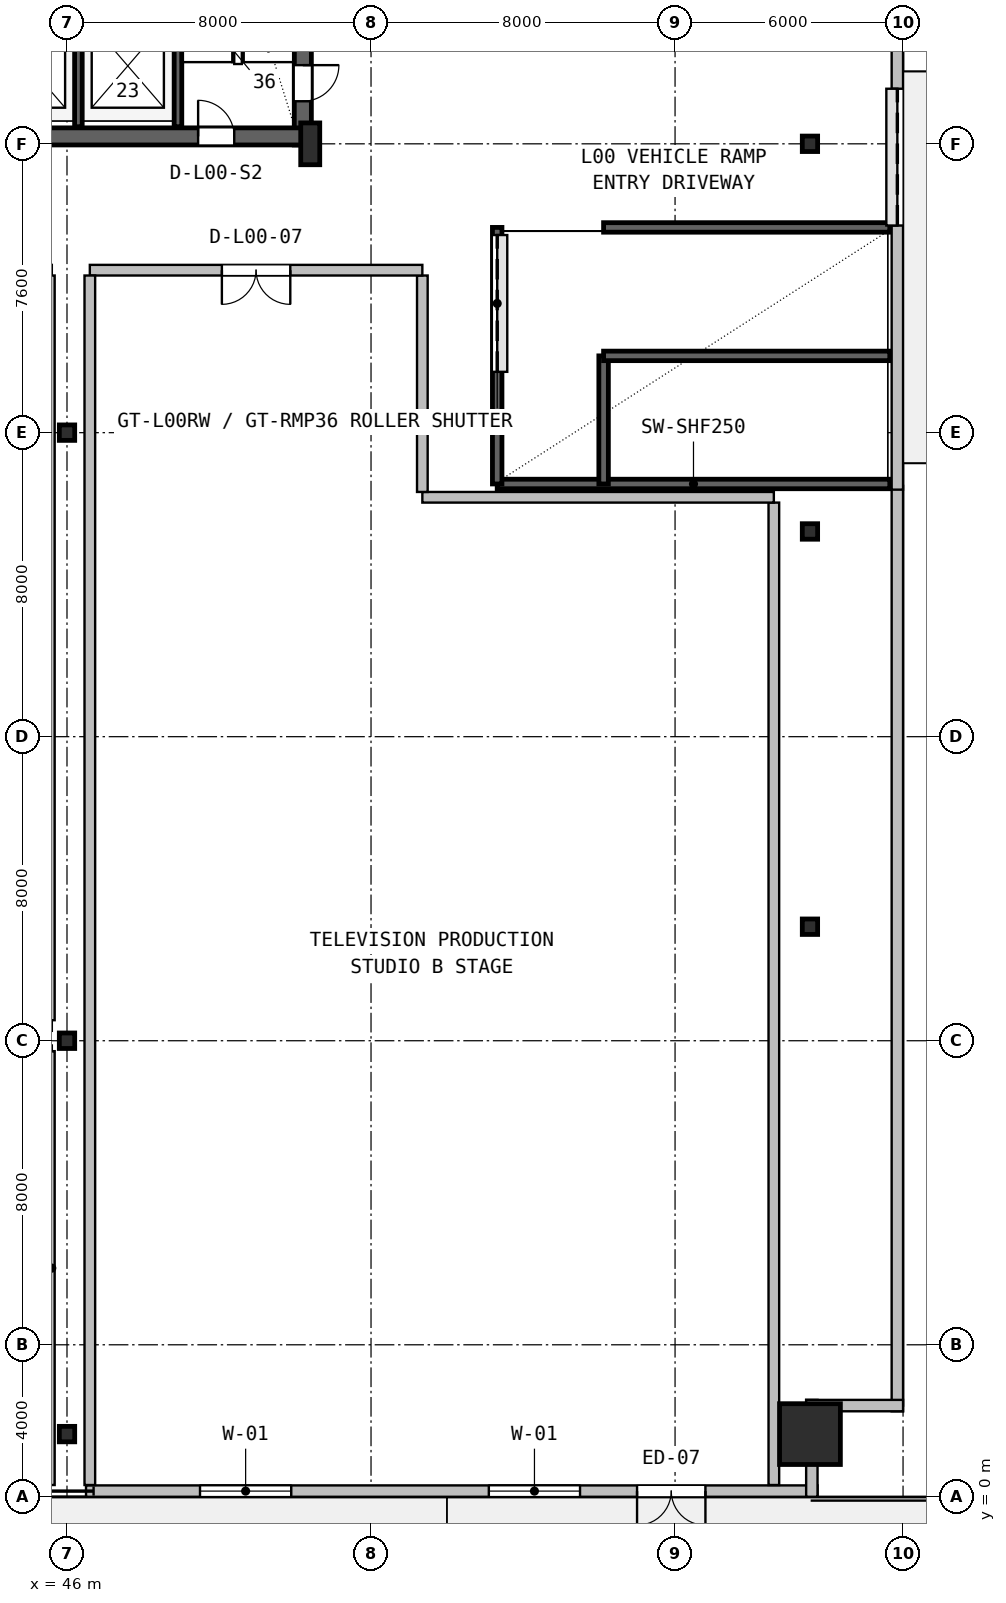
"""IFC4 building model, lengths in metres.
Left out: names, types, materials, properties, quantities, classifications, styles, units other than length and angle.
Written with IfcOpenShell. Run it as: python <this file> out.ifc"""

import sys

from ifc_helpers import new_model, si_unit, direction, frame, frame_2d, origin, origin_2d, place, context, subcontext, project, spatial, rectangle, hollow_rectangle, i_section, extrude, source, transform, mapped, element, fill, save


model = new_model("IFC4")
c1 = context("Model", 3, precision=1e-05, world=origin(), true_north=direction((0.0, 1.0)))
c2 = subcontext(c1, "Body", "Model", "MODEL_VIEW")
j1 = project(units=[si_unit("LENGTHUNIT", "METRE"), si_unit("PLANEANGLEUNIT", "RADIAN")], contexts=[c1])
p1 = place(None, origin())
s1 = spatial("IfcSite", under=j1, at=p1, CompositionType="ELEMENT")
p2 = place(p1, origin())
s2 = spatial("IfcBuilding", under=s1, at=p2, CompositionType="ELEMENT")
p3 = place(p2, origin())
s3 = spatial("IfcBuildingStorey", under=s2, at=p3, CompositionType="ELEMENT", Elevation=0.0)
p4 = place(p3, frame((52.205, 35.57, 0.0), z_axis=(0.0, 0.0, 1.0), x_axis=(0.0, 1.0, 0.0)))
e1 = element("IfcWall", 1, at=p4, inside=s3, PredefinedType="SHEAR", context=c2, shape_type="SweptSolid", body=[
    extrude(rectangle(XDim=11.23, YDim=0.45, at=frame_2d((5.615, 0.0))), origin(), (0.0, 0.0, 1.0), 5.72),
])
p5 = place(p4, frame((1.15, 0.0, 0.0)))
e2 = element("IfcOpeningElement", 2, at=p5, cuts=e1, PredefinedType="OPENING", context=c2, shape_type="SweptSolid", body=[
    extrude(rectangle(XDim=0.95, YDim=2.1, at=frame_2d((0.475, 1.05))), frame((0.0, 0.235, 0.0), z_axis=(0.0, -1.0, 0.0), x_axis=(1.0, 0.0, 0.0)), (0.0, 0.0, 1.0), 0.47),
])
p6 = place(p3, frame((43.2, 35.795, 0.0), z_axis=(0.0, 0.0, 1.0), x_axis=(1.0, 0.0, 0.0)))
e3 = element("IfcWall", 3, at=p6, inside=s3, PredefinedType="SHEAR", context=c2, shape_type="SweptSolid", body=[
    extrude(rectangle(XDim=9.23, YDim=0.45, at=frame_2d((4.615, 0.0))), origin(), (0.0, 0.0, 1.0), 5.72),
])
p7 = place(p6, frame((6.25, 0.0, 0.0)))
e4 = element("IfcOpeningElement", 4, at=p7, cuts=e3, PredefinedType="OPENING", context=c2, shape_type="SweptSolid", body=[
    extrude(rectangle(XDim=0.95, YDim=2.1, at=frame_2d((0.475, 1.05))), frame((0.0, 0.235, 0.0), z_axis=(0.0, -1.0, 0.0), x_axis=(1.0, 0.0, 0.0)), (0.0, 0.0, 1.0), 0.47),
])
m1 = source(origin(), c2, "Body", "SweptSolid", [
    extrude(i_section(OverallWidth=0.5, OverallDepth=1.1, WebThickness=0.018, FlangeThickness=0.032, FilletRadius=0.018, at=origin_2d()), origin(), (0.0, 0.0, 1.0), 6.0),
])
p8 = place(p3, frame((52.4, 35.6, 0.0), z_axis=(0.0, 0.0, 1.0), x_axis=(1.0, 0.0, 0.0)))
e5 = element("IfcColumn", 5, at=p8, inside=s3, PredefinedType="COLUMN", context=c2, shape_type="MappedRepresentation", body=[
    mapped(m1, transform((0.0, 0.0, 0.0), x_axis=(1.0, 0.0, 0.0), y_axis=(0.0, 1.0, 0.0), z_axis=(0.0, 0.0, 1.0), scale=1.0)),
])
m2 = source(origin(), c2, "Body", "SweptSolid", [
    extrude(hollow_rectangle(XDim=1.6, YDim=1.6, WallThickness=0.06, at=origin_2d()), origin(), (0.0, 0.0, 1.0), 6.0),
])
p9 = place(p3, frame((65.55, 1.65, 0.0), z_axis=(0.0, 0.0, 1.0), x_axis=(1.0, 0.0, 0.0)))
e6 = element("IfcColumn", 6, at=p9, inside=s3, PredefinedType="COLUMN", context=c2, shape_type="MappedRepresentation", body=[
    mapped(m2, transform((0.0, 0.0, 0.0), x_axis=(1.0, 0.0, 0.0), y_axis=(0.0, 1.0, 0.0), z_axis=(0.0, 0.0, 1.0), scale=1.0)),
])
m3 = source(origin(), c2, "Body", "SweptSolid", [
    extrude(i_section(OverallWidth=0.404, OverallDepth=0.407, WebThickness=0.027, FlangeThickness=0.044, FilletRadius=0.018, at=origin_2d()), origin(), (0.0, 0.0, 1.0), 6.0),
])
for number, where, z_axis, x_axis in (
    (7, (46.0, 1.65, 0.0), (0.0, 0.0, 1.0), (1.0, 0.0, 0.0)),
    (8, (46.0, 12.0, 0.0), (0.0, 0.0, 1.0), (1.0, 0.0, 0.0)),
    (9, (46.0, 28.0, 0.0), (0.0, 0.0, 1.0), (1.0, 0.0, 0.0)),
    (10, (65.55, 15.0, 0.0), (0.0, 0.0, 1.0), (1.0, 0.0, 0.0)),
    (11, (65.55, 25.4, 0.0), (0.0, 0.0, 1.0), (1.0, 0.0, 0.0)),
    (12, (65.55, 35.6, 0.0), (0.0, 0.0, 1.0), (1.0, 0.0, 0.0)),
):
    element("IfcColumn", number, at=place(p3, frame(where, z_axis=z_axis, x_axis=x_axis)), inside=s3, PredefinedType="COLUMN", context=c2, shape_type="MappedRepresentation", body=[
        mapped(m3, transform((0.0, 0.0, 0.0), x_axis=(1.0, 0.0, 0.0), y_axis=(0.0, 1.0, 0.0), z_axis=(0.0, 0.0, 1.0), scale=1.0)),
    ])
p10 = place(p3, frame((57.32, 26.65, 0.0), z_axis=(0.0, 0.0, 1.0), x_axis=(1.0, 0.0, 0.0)))
e13 = element("IfcWall", 13, at=p10, inside=s3, PredefinedType="SHEAR", context=c2, shape_type="SweptSolid", body=[
    extrude(rectangle(XDim=10.33, YDim=0.25, at=frame_2d((5.165, 0.0))), origin(), (0.0, 0.0, 1.0), 5.72),
])
p11 = place(p3, frame((57.32, 26.65, 0.0), z_axis=(0.0, 0.0, 1.0), x_axis=(0.0, 1.0, 0.0)))
e14 = element("IfcWall", 14, at=p11, inside=s3, PredefinedType="SHEAR", context=c2, shape_type="SweptSolid", body=[
    extrude(rectangle(XDim=6.75, YDim=0.25, at=frame_2d((3.375, 0.0))), origin(), (0.0, 0.0, 1.0), 5.72),
])
p12 = place(p11, frame((2.95, 0.0, 0.0)))
e15 = element("IfcOpeningElement", 15, at=p12, cuts=e14, PredefinedType="OPENING", context=c2, shape_type="SweptSolid", body=[
    extrude(rectangle(XDim=3.6, YDim=2.35, at=frame_2d((1.8, 1.175))), frame((0.0, 0.135, 0.0), z_axis=(0.0, -1.0, 0.0), x_axis=(1.0, 0.0, 0.0)), (0.0, 0.0, 1.0), 0.27),
])
p13 = place(p3, frame((60.12, 33.4, 0.0), z_axis=(0.0, 0.0, 1.0), x_axis=(1.0, 0.0, 0.0)))
e16 = element("IfcWall", 16, at=p13, inside=s3, PredefinedType="SHEAR", context=c2, shape_type="SweptSolid", body=[
    extrude(rectangle(XDim=7.53, YDim=0.25, at=frame_2d((3.765, 0.0))), origin(), (0.0, 0.0, 1.0), 5.72),
])
p14 = place(p3, frame((60.12, 26.65, 0.0), z_axis=(0.0, 0.0, 1.0), x_axis=(0.0, 1.0, 0.0)))
e17 = element("IfcWall", 17, at=p14, inside=s3, PredefinedType="SHEAR", context=c2, shape_type="SweptSolid", body=[
    extrude(rectangle(XDim=3.37, YDim=0.25, at=frame_2d((1.685, 0.0))), origin(), (0.0, 0.0, 1.0), 5.72),
])
p15 = place(p3, frame((60.12, 30.02, 0.0), z_axis=(0.0, 0.0, 1.0), x_axis=(1.0, 0.0, 0.0)))
e18 = element("IfcWall", 18, at=p15, inside=s3, PredefinedType="SHEAR", context=c2, shape_type="SweptSolid", body=[
    extrude(rectangle(XDim=7.53, YDim=0.25, at=frame_2d((3.765, 0.0))), origin(), (0.0, 0.0, 1.0), 5.72),
])
p16 = place(p3, frame((46.5, 0.15, 0.0), z_axis=(0.0, 0.0, 1.0), x_axis=(1.0, 0.0, 0.0)))
e19 = element("IfcWall", 19, at=p16, inside=s3, PredefinedType="SOLIDWALL", context=c2, shape_type="SweptSolid", body=[
    extrude(rectangle(XDim=19.25, YDim=0.3, at=frame_2d((9.625, 0.0))), origin(), (0.0, 0.0, 1.0), 5.7),
])
p17 = place(p16, frame((14.5, 0.0, 0.0)))
e20 = element("IfcOpeningElement", 20, at=p17, cuts=e19, PredefinedType="OPENING", context=c2, shape_type="SweptSolid", body=[
    extrude(rectangle(XDim=1.8, YDim=2.15, at=frame_2d((0.9, 1.075))), frame((0.0, 0.16, 0.0), z_axis=(0.0, -1.0, 0.0), x_axis=(1.0, 0.0, 0.0)), (0.0, 0.0, 1.0), 0.32),
])
p18 = place(p16, frame((3.0, 0.0, 0.9)))
e21 = element("IfcOpeningElement", 21, at=p18, cuts=e19, PredefinedType="OPENING", context=c2, shape_type="SweptSolid", body=[
    extrude(rectangle(XDim=2.4, YDim=2.4, at=frame_2d((1.2, 1.2))), frame((0.0, 0.16, 0.0), z_axis=(0.0, -1.0, 0.0), x_axis=(1.0, 0.0, 0.0)), (0.0, 0.0, 1.0), 0.32),
])
p19 = place(p16, frame((10.6, 0.0, 0.9)))
e22 = element("IfcOpeningElement", 22, at=p19, cuts=e19, PredefinedType="OPENING", context=c2, shape_type="SweptSolid", body=[
    extrude(rectangle(XDim=2.4, YDim=2.4, at=frame_2d((1.2, 1.2))), frame((0.0, 0.16, 0.0), z_axis=(0.0, -1.0, 0.0), x_axis=(1.0, 0.0, 0.0)), (0.0, 0.0, 1.0), 0.32),
])
p20 = place(p3, frame((67.85, 2.25, 0.0), z_axis=(0.0, 0.0, 1.0), x_axis=(0.0, 1.0, 0.0)))
e23 = element("IfcWall", 23, at=p20, inside=s3, PredefinedType="SOLIDWALL", context=c2, shape_type="SweptSolid", body=[
    extrude(rectangle(XDim=24.35, YDim=0.3, at=frame_2d((12.175, 0.0))), origin(), (0.0, 0.0, 1.0), 5.7),
])
p21 = place(p3, frame((67.85, 26.5, 0.0), z_axis=(0.0, 0.0, 1.0), x_axis=(0.0, 1.0, 0.0)))
e24 = element("IfcWall", 24, at=p21, inside=s3, PredefinedType="SOLIDWALL", context=c2, shape_type="SweptSolid", body=[
    extrude(rectangle(XDim=19.25, YDim=0.3, at=frame_2d((9.625, 0.0))), origin(), (0.0, 0.0, 1.0), 5.7),
])
p22 = place(p21, frame((6.95, 0.0, 0.0)))
e25 = element("IfcOpeningElement", 25, at=p22, cuts=e24, PredefinedType="OPENING", context=c2, shape_type="SweptSolid", body=[
    extrude(rectangle(XDim=3.6, YDim=2.7, at=frame_2d((1.8, 1.35))), frame((0.0, 0.16, 0.0), z_axis=(0.0, -1.0, 0.0), x_axis=(1.0, 0.0, 0.0)), (0.0, 0.0, 1.0), 0.32),
])
p23 = place(p21, frame((14.8, 0.0, 0.9)))
e26 = element("IfcOpeningElement", 26, at=p23, cuts=e24, PredefinedType="OPENING", context=c2, shape_type="SweptSolid", body=[
    extrude(rectangle(XDim=2.4, YDim=2.4, at=frame_2d((1.2, 1.2))), frame((0.0, 0.16, 0.0), z_axis=(0.0, -1.0, 0.0), x_axis=(1.0, 0.0, 0.0)), (0.0, 0.0, 1.0), 0.32),
])
for number, where, z_axis, x_axis in (
    (27, (65.6, 0.0, 0.0), (0.0, 0.0, 1.0), (0.0, 1.0, 0.0)),
    (28, (65.45, 2.4, 0.0), (0.0, 0.0, 1.0), (1.0, 0.0, 0.0)),
):
    element("IfcWall", number, at=place(p3, frame(where, z_axis=z_axis, x_axis=x_axis)), inside=s3, PredefinedType="SOLIDWALL", context=c2, shape_type="SweptSolid", body=[
        extrude(rectangle(XDim=2.55, YDim=0.3, at=frame_2d((1.275, 0.0))), origin(), (0.0, 0.0, 1.0), 4.783),
    ])
p24 = place(p3, frame((48.92, 36.05, 0.0), z_axis=(0.0, 0.0, 1.0), x_axis=(0.0, 1.0, 0.0)))
e29 = element("IfcWall", 29, at=p24, inside=s3, PredefinedType="SHEAR", context=c2, shape_type="SweptSolid", body=[
    extrude(rectangle(XDim=10.5, YDim=0.2, at=frame_2d((5.25, 0.0))), origin(), (0.0, 0.0, 1.0), 5.72),
])
p25 = place(p3, frame((46.3, 36.05, 0.0), z_axis=(0.0, 0.0, 1.0), x_axis=(0.0, 1.0, 0.0)))
e30 = element("IfcWall", 30, at=p25, inside=s3, PredefinedType="SHEAR", context=c2, shape_type="SweptSolid", body=[
    extrude(rectangle(XDim=3.05, YDim=0.2, at=frame_2d((1.525, 0.0))), origin(), (0.0, 0.0, 1.0), 5.72),
])
p26 = place(p3, frame((45.6, 0.31, 0.0), z_axis=(0.0, 0.0, 1.0), x_axis=(0.0, 1.0, 0.0)))
e31 = element("IfcWall", 31, at=p26, inside=s3, PredefinedType="PARTITIONING", context=c2, shape_type="SweptSolid", body=[
    extrude(rectangle(XDim=11.415, YDim=0.15, at=frame_2d((5.708, 0.0))), origin(), (0.0, 0.0, 1.0), 4.783),
])
p27 = place(p3, frame((64.6, 0.31, 0.0), z_axis=(0.0, 0.0, 1.0), x_axis=(0.0, 1.0, 0.0)))
e32 = element("IfcWall", 32, at=p27, inside=s3, PredefinedType="SOLIDWALL", context=c2, shape_type="SweptSolid", body=[
    extrude(rectangle(XDim=25.85, YDim=0.28, at=frame_2d((12.925, 0.0))), origin(), (0.0, 0.0, 1.0), 4.783),
])
p28 = place(p3, frame((55.35, 26.3, 0.0), z_axis=(0.0, 0.0, 1.0), x_axis=(1.0, 0.0, 0.0)))
e33 = element("IfcWall", 33, at=p28, inside=s3, PredefinedType="SOLIDWALL", context=c2, shape_type="SweptSolid", body=[
    extrude(rectangle(XDim=9.25, YDim=0.28, at=frame_2d((4.625, 0.0))), origin(), (0.0, 0.0, 1.0), 4.783),
])
p29 = place(p3, frame((55.35, 26.44, 0.0), z_axis=(0.0, 0.0, 1.0), x_axis=(0.0, 1.0, 0.0)))
e34 = element("IfcWall", 34, at=p29, inside=s3, PredefinedType="SOLIDWALL", context=c2, shape_type="SweptSolid", body=[
    extrude(rectangle(XDim=5.695, YDim=0.28, at=frame_2d((2.848, 0.0))), origin(), (0.0, 0.0, 1.0), 4.783),
])
p30 = place(p3, frame((46.6, 32.275, 0.0), z_axis=(0.0, 0.0, 1.0), x_axis=(1.0, 0.0, 0.0)))
e35 = element("IfcWall", 35, at=p30, inside=s3, PredefinedType="SOLIDWALL", context=c2, shape_type="SweptSolid", body=[
    extrude(rectangle(XDim=8.75, YDim=0.28, at=frame_2d((4.375, 0.0))), origin(), (0.0, 0.0, 1.0), 5.7),
])
p31 = place(p30, frame((3.475, 0.0, 0.0)))
e36 = element("IfcOpeningElement", 36, at=p31, cuts=e35, PredefinedType="OPENING", context=c2, shape_type="SweptSolid", body=[
    extrude(rectangle(XDim=1.8, YDim=2.25, at=frame_2d((0.9, 1.125))), frame((0.0, 0.15, 0.0), z_axis=(0.0, -1.0, 0.0), x_axis=(1.0, 0.0, 0.0)), (0.0, 0.0, 1.0), 0.3),
])
p32 = place(p3, frame((46.6, 0.31, 0.0), z_axis=(0.0, 0.0, 1.0), x_axis=(0.0, 1.0, 0.0)))
e37 = element("IfcWall", 37, at=p32, inside=s3, PredefinedType="SOLIDWALL", context=c2, shape_type="SweptSolid", body=[
    extrude(rectangle(XDim=31.825, YDim=0.28, at=frame_2d((15.913, 0.0))), origin(), (0.0, 0.0, 1.0), 4.783),
])
p33 = place(p3, frame((45.6, 12.54, 0.0), z_axis=(0.0, 0.0, 1.0), x_axis=(0.0, 1.0, 0.0)))
e38 = element("IfcWall", 38, at=p33, inside=s3, PredefinedType="PARTITIONING", context=c2, shape_type="SweptSolid", body=[
    extrude(rectangle(XDim=19.595, YDim=0.15, at=frame_2d((9.797, 0.0))), origin(), (0.0, 0.0, 1.0), 4.783),
])
m4 = source(origin(), c2, "Body", "SweptSolid", [
    extrude(rectangle(XDim=1.8, YDim=2.15, at=frame_2d((0.9, 1.075))), frame((0.0, 0.025, 0.0), z_axis=(0.0, -1.0, 0.0), x_axis=(1.0, 0.0, 0.0)), (0.0, 0.0, 1.0), 0.05),
])
p34 = place(p17, frame((1.8, 0.0, 0.0), z_axis=(0.0, 0.0, 1.0), x_axis=(-1.0, 0.0, 0.0)))
e39 = element("IfcDoor", 39, at=p34, inside=s3, OperationType="DOUBLE_DOOR_SINGLE_SWING", PredefinedType="DOOR", context=c2, shape_type="MappedRepresentation", body=[
    mapped(m4, transform((0.0, 0.0, 0.0), x_axis=(1.0, 0.0, 0.0), y_axis=(0.0, 1.0, 0.0), z_axis=(0.0, 0.0, 1.0), scale=1.0)),
])
fill(e20, e39)
m5 = source(origin(), c2, "Body", "SweptSolid", [
    extrude(rectangle(XDim=2.4, YDim=2.4, at=frame_2d((1.2, 1.2))), frame((0.0, 0.03, 0.0), z_axis=(0.0, -1.0, 0.0), x_axis=(1.0, 0.0, 0.0)), (0.0, 0.0, 1.0), 0.06),
])
p35 = place(p18, origin())
e40 = element("IfcWindow", 40, at=p35, inside=s3, PartitioningType="DOUBLE_PANEL_VERTICAL", PredefinedType="WINDOW", context=c2, shape_type="MappedRepresentation", body=[
    mapped(m5, transform((0.0, 0.0, 0.0), x_axis=(1.0, 0.0, 0.0), y_axis=(0.0, 1.0, 0.0), z_axis=(0.0, 0.0, 1.0), scale=1.0)),
])
fill(e21, e40)
p36 = place(p19, origin())
e41 = element("IfcWindow", 41, at=p36, inside=s3, PartitioningType="DOUBLE_PANEL_VERTICAL", PredefinedType="WINDOW", context=c2, shape_type="MappedRepresentation", body=[
    mapped(m5, transform((0.0, 0.0, 0.0), x_axis=(1.0, 0.0, 0.0), y_axis=(0.0, 1.0, 0.0), z_axis=(0.0, 0.0, 1.0), scale=1.0)),
])
fill(e22, e41)
m6 = source(origin(), c2, "Body", "SweptSolid", [
    extrude(rectangle(XDim=3.6, YDim=2.7, at=frame_2d((1.8, 1.35))), frame((0.0, 0.025, 0.0), z_axis=(0.0, -1.0, 0.0), x_axis=(1.0, 0.0, 0.0)), (0.0, 0.0, 1.0), 0.05),
])
p37 = place(p22, origin())
e42 = element("IfcDoor", 42, at=p37, inside=s3, OperationType="ROLLINGUP", PredefinedType="GATE", context=c2, shape_type="MappedRepresentation", body=[
    mapped(m6, transform((0.0, 0.0, 0.0), x_axis=(1.0, 0.0, 0.0), y_axis=(0.0, 1.0, 0.0), z_axis=(0.0, 0.0, 1.0), scale=1.0)),
])
fill(e25, e42)
m7 = source(origin(), c2, "Body", "SweptSolid", [
    extrude(rectangle(XDim=0.95, YDim=2.1, at=frame_2d((0.475, 1.05))), frame((0.0, 0.025, 0.0), z_axis=(0.0, -1.0, 0.0), x_axis=(1.0, 0.0, 0.0)), (0.0, 0.0, 1.0), 0.05),
])
p38 = place(p7, origin())
e43 = element("IfcDoor", 43, at=p38, inside=s3, OperationType="SINGLE_SWING_LEFT", PredefinedType="DOOR", context=c2, shape_type="MappedRepresentation", body=[
    mapped(m7, transform((0.0, 0.0, 0.0), x_axis=(1.0, 0.0, 0.0), y_axis=(0.0, 1.0, 0.0), z_axis=(0.0, 0.0, 1.0), scale=1.0)),
])
fill(e4, e43)
m8 = source(origin(), c2, "Body", "SweptSolid", [
    extrude(rectangle(XDim=3.6, YDim=2.35, at=frame_2d((1.8, 1.175))), frame((0.0, 0.025, 0.0), z_axis=(0.0, -1.0, 0.0), x_axis=(1.0, 0.0, 0.0)), (0.0, 0.0, 1.0), 0.05),
])
p39 = place(p12, frame((3.6, 0.0, 0.0), z_axis=(0.0, 0.0, 1.0), x_axis=(-1.0, 0.0, 0.0)))
e44 = element("IfcDoor", 44, at=p39, inside=s3, OperationType="ROLLINGUP", PredefinedType="GATE", context=c2, shape_type="MappedRepresentation", body=[
    mapped(m8, transform((0.0, 0.0, 0.0), x_axis=(1.0, 0.0, 0.0), y_axis=(0.0, 1.0, 0.0), z_axis=(0.0, 0.0, 1.0), scale=1.0)),
])
fill(e15, e44)
p40 = place(p5, frame((0.95, 0.0, 0.0), z_axis=(0.0, 0.0, 1.0), x_axis=(-1.0, 0.0, 0.0)))
e45 = element("IfcDoor", 45, at=p40, inside=s3, OperationType="SINGLE_SWING_RIGHT", PredefinedType="DOOR", context=c2, shape_type="MappedRepresentation", body=[
    mapped(m7, transform((0.0, 0.0, 0.0), x_axis=(1.0, 0.0, 0.0), y_axis=(0.0, 1.0, 0.0), z_axis=(0.0, 0.0, 1.0), scale=1.0)),
])
fill(e2, e45)
m9 = source(origin(), c2, "Body", "SweptSolid", [
    extrude(rectangle(XDim=1.8, YDim=2.25, at=frame_2d((0.9, 1.125))), frame((0.0, 0.025, 0.0), z_axis=(0.0, -1.0, 0.0), x_axis=(1.0, 0.0, 0.0)), (0.0, 0.0, 1.0), 0.05),
])
p41 = place(p31, frame((1.8, 0.0, 0.0), z_axis=(0.0, 0.0, 1.0), x_axis=(-1.0, 0.0, 0.0)))
e46 = element("IfcDoor", 46, at=p41, inside=s3, OperationType="DOUBLE_DOOR_SINGLE_SWING", PredefinedType="DOOR", context=c2, shape_type="MappedRepresentation", body=[
    mapped(m9, transform((0.0, 0.0, 0.0), x_axis=(1.0, 0.0, 0.0), y_axis=(0.0, 1.0, 0.0), z_axis=(0.0, 0.0, 1.0), scale=1.0)),
])
fill(e36, e46)
save(model, sys.argv[1])
